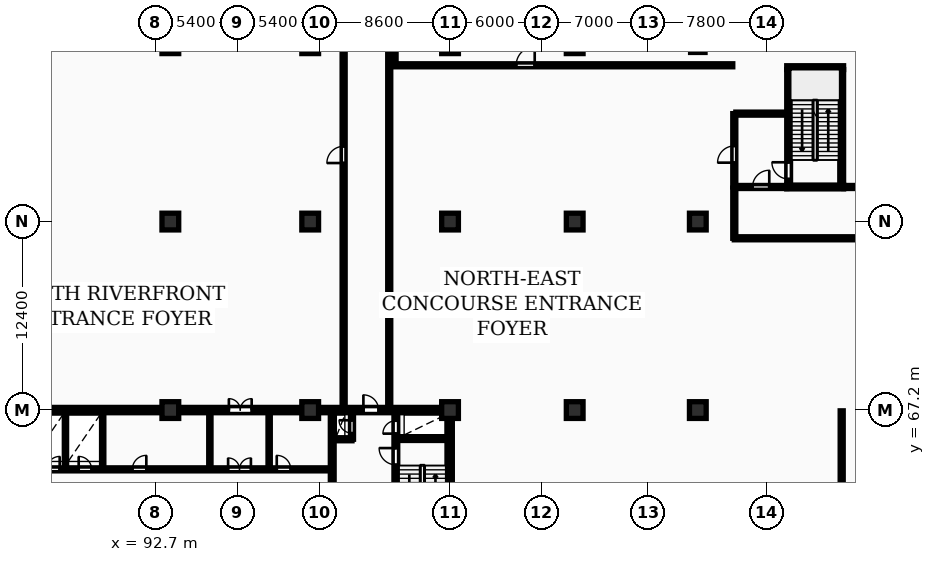
"""IFC4 building model, lengths in metres.
Left out: names, types, materials, properties, quantities, classifications, styles, units other than length and angle.
Written with IfcOpenShell. Run it as: python <this file> out.ifc"""

import sys

from ifc_helpers import new_model, si_unit, direction, frame, frame_2d, origin, origin_2d, place, context, subcontext, project, spatial, rectangle, circle, extrude, element, fill, save


model = new_model("IFC4")
c1 = context("Model", 3, precision=1e-05, world=origin(), true_north=direction((0.0, 1.0)))
c2 = subcontext(c1, "Body", "Model", "MODEL_VIEW")
j1 = project(units=[si_unit("LENGTHUNIT", "METRE"), si_unit("PLANEANGLEUNIT", "RADIAN")], contexts=[c1])
p1 = place(None, origin())
s1 = spatial("IfcSite", under=j1, at=p1, CompositionType="ELEMENT")
p2 = place(p1, origin())
s2 = spatial("IfcBuilding", under=s1, at=p2, CompositionType="ELEMENT")
p3 = place(p2, origin())
s3 = spatial("IfcBuildingStorey", under=s2, at=p3, CompositionType="ELEMENT", Elevation=0.0)
for number, where, z_axis, x_axis in (
    (1, (93.7, 67.2, 0.0), (0.0, 0.0, 1.0), (1.0, 0.0, 0.0)),
    (2, (93.7, 79.6, 0.0), (0.0, 0.0, 1.0), (1.0, 0.0, 0.0)),
    (3, (93.7, 91.2, 0.0), (0.0, 0.0, 1.0), (1.0, 0.0, 0.0)),
    (4, (102.9, 67.2, 0.0), (0.0, 0.0, 1.0), (1.0, 0.0, 0.0)),
    (5, (102.9, 79.6, 0.0), (0.0, 0.0, 1.0), (1.0, 0.0, 0.0)),
    (6, (102.9, 91.2, 0.0), (0.0, 0.0, 1.0), (1.0, 0.0, 0.0)),
    (7, (112.1, 67.2, 0.0), (0.0, 0.0, 1.0), (1.0, 0.0, 0.0)),
    (8, (112.1, 79.6, 0.0), (0.0, 0.0, 1.0), (1.0, 0.0, 0.0)),
    (9, (112.1, 91.2, 0.0), (0.0, 0.0, 1.0), (1.0, 0.0, 0.0)),
    (10, (120.3, 67.2, 0.0), (0.0, 0.0, 1.0), (1.0, 0.0, 0.0)),
    (11, (120.3, 79.6, 0.0), (0.0, 0.0, 1.0), (1.0, 0.0, 0.0)),
    (12, (120.3, 91.2, 0.0), (0.0, 0.0, 1.0), (1.0, 0.0, 0.0)),
    (13, (128.4, 67.2, 0.0), (0.0, 0.0, 1.0), (1.0, 0.0, 0.0)),
    (14, (128.4, 79.6, 0.0), (0.0, 0.0, 1.0), (1.0, 0.0, 0.0)),
):
    element("IfcColumn", number, at=place(p3, frame(where, z_axis=z_axis, x_axis=x_axis)), inside=s3, PredefinedType="COLUMN", context=c2, shape_type="SweptSolid", body=[
        extrude(rectangle(XDim=1.1, YDim=1.1, at=origin_2d()), origin(), (0.0, 0.0, 1.0), 5.4),
    ])
p4 = place(p3, frame((128.4, 91.2, 0.0), z_axis=(0.0, 0.0, 1.0), x_axis=(1.0, 0.0, 0.0)))
e15 = element("IfcColumn", 15, at=p4, inside=s3, PredefinedType="COLUMN", context=c2, shape_type="SweptSolid", body=[
    extrude(circle(Radius=0.475, at=origin_2d()), origin(), (0.0, 0.0, 1.0), 5.4),
])
p5 = place(p3, frame((112.075, 55.375, 0.0), z_axis=(0.0, 0.0, 1.0), x_axis=(0.0, 1.0, 0.0)))
e16 = element("IfcWall", 16, at=p5, inside=s3, PredefinedType="SHEAR", context=c2, shape_type="SweptSolid", body=[
    extrude(rectangle(XDim=11.65, YDim=0.35, at=frame_2d((5.825, 0.0))), origin(), (0.0, 0.0, 1.0), 5.4),
])
p6 = place(p3, frame((75.95, 67.2, 0.0), z_axis=(0.0, 0.0, 1.0), x_axis=(1.0, 0.0, 0.0)))
e17 = element("IfcWall", 17, at=p6, inside=s3, PredefinedType="SHEAR", context=c2, shape_type="SweptSolid", body=[
    extrude(rectangle(XDim=36.3, YDim=0.35, at=frame_2d((18.15, 0.0))), origin(), (0.0, 0.0, 1.0), 5.4),
])
p7 = place(p6, frame((5.25, 0.0, 0.0)))
e18 = element("IfcOpeningElement", 18, at=p7, cuts=e17, PredefinedType="OPENING", context=c2, shape_type="SweptSolid", body=[
    extrude(rectangle(XDim=1.0, YDim=2.15, at=frame_2d((0.5, 1.075))), frame((0.0, 0.185, 0.0), z_axis=(0.0, -1.0, 0.0), x_axis=(1.0, 0.0, 0.0)), (0.0, 0.0, 1.0), 0.37),
])
p8 = place(p6, frame((21.6, 0.0, 0.0)))
e19 = element("IfcOpeningElement", 19, at=p8, cuts=e17, PredefinedType="OPENING", context=c2, shape_type="SweptSolid", body=[
    extrude(rectangle(XDim=1.5, YDim=2.2, at=frame_2d((0.75, 1.1))), frame((0.0, 0.185, 0.0), z_axis=(0.0, -1.0, 0.0), x_axis=(1.0, 0.0, 0.0)), (0.0, 0.0, 1.0), 0.37),
])
p9 = place(p6, frame((30.45, 0.0, 0.0)))
e20 = element("IfcOpeningElement", 20, at=p9, cuts=e17, PredefinedType="OPENING", context=c2, shape_type="SweptSolid", body=[
    extrude(rectangle(XDim=1.0, YDim=2.15, at=frame_2d((0.5, 1.075))), frame((0.0, 0.185, 0.0), z_axis=(0.0, -1.0, 0.0), x_axis=(1.0, 0.0, 0.0)), (0.0, 0.0, 1.0), 0.37),
])
for number, where, z_axis, x_axis in (
    (21, (86.8, 63.4, 0.0), (0.0, 0.0, 1.0), (0.0, 1.0, 0.0)),
    (22, (89.25, 63.4, 0.0), (0.0, 0.0, 1.0), (0.0, 1.0, 0.0)),
    (23, (96.3, 63.4, 0.0), (0.0, 0.0, 1.0), (0.0, 1.0, 0.0)),
    (24, (100.2, 63.4, 0.0), (0.0, 0.0, 1.0), (0.0, 1.0, 0.0)),
):
    element("IfcWall", number, at=place(p3, frame(where, z_axis=z_axis, x_axis=x_axis)), inside=s3, PredefinedType="PARTITIONING", context=c2, shape_type="SweptSolid", body=[
        extrude(rectangle(XDim=3.6, YDim=0.15, at=frame_2d((1.8, 0.0))), origin(), (0.0, 0.0, 1.0), 5.1),
    ])
p10 = place(p3, frame((84.42, 63.3, 0.0), z_axis=(0.0, 0.0, 1.0), x_axis=(1.0, 0.0, 0.0)))
e25 = element("IfcWall", 25, at=p10, inside=s3, PredefinedType="PARTITIONING", context=c2, shape_type="SweptSolid", body=[
    extrude(rectangle(XDim=19.83, YDim=0.2, at=frame_2d((9.915, 0.0))), origin(), (0.0, 0.0, 1.0), 5.1),
])
p11 = place(p10, frame((1.15, 0.0, 0.0)))
e26 = element("IfcOpeningElement", 26, at=p11, cuts=e25, PredefinedType="OPENING", context=c2, shape_type="SweptSolid", body=[
    extrude(rectangle(XDim=0.85, YDim=2.05, at=frame_2d((0.425, 1.025))), frame((0.0, 0.11, 0.0), z_axis=(0.0, -1.0, 0.0), x_axis=(1.0, 0.0, 0.0)), (0.0, 0.0, 1.0), 0.22),
])
p12 = place(p10, frame((3.25, 0.0, 0.0)))
e27 = element("IfcOpeningElement", 27, at=p12, cuts=e25, PredefinedType="OPENING", context=c2, shape_type="SweptSolid", body=[
    extrude(rectangle(XDim=0.85, YDim=2.05, at=frame_2d((0.425, 1.025))), frame((0.0, 0.11, 0.0), z_axis=(0.0, -1.0, 0.0), x_axis=(1.0, 0.0, 0.0)), (0.0, 0.0, 1.0), 0.22),
])
p13 = place(p10, frame((13.08, 0.0, 0.0)))
e28 = element("IfcOpeningElement", 28, at=p13, cuts=e25, PredefinedType="OPENING", context=c2, shape_type="SweptSolid", body=[
    extrude(rectangle(XDim=1.5, YDim=2.2, at=frame_2d((0.75, 1.1))), frame((0.0, 0.11, 0.0), z_axis=(0.0, -1.0, 0.0), x_axis=(1.0, 0.0, 0.0)), (0.0, 0.0, 1.0), 0.22),
])
p14 = place(p10, frame((6.78, 0.0, 0.0)))
e29 = element("IfcOpeningElement", 29, at=p14, cuts=e25, PredefinedType="OPENING", context=c2, shape_type="SweptSolid", body=[
    extrude(rectangle(XDim=0.92, YDim=2.08, at=frame_2d((0.46, 1.04))), frame((0.0, 0.11, 0.0), z_axis=(0.0, -1.0, 0.0), x_axis=(1.0, 0.0, 0.0)), (0.0, 0.0, 1.0), 0.22),
])
p15 = place(p10, frame((16.28, 0.0, 0.0)))
e30 = element("IfcOpeningElement", 30, at=p15, cuts=e25, PredefinedType="OPENING", context=c2, shape_type="SweptSolid", body=[
    extrude(rectangle(XDim=0.92, YDim=2.08, at=frame_2d((0.46, 1.04))), frame((0.0, 0.11, 0.0), z_axis=(0.0, -1.0, 0.0), x_axis=(1.0, 0.0, 0.0)), (0.0, 0.0, 1.0), 0.22),
])
p16 = place(p3, frame((104.45, 65.28, 0.0), z_axis=(0.0, 0.0, 1.0), x_axis=(1.0, 0.0, 0.0)))
e31 = element("IfcWall", 31, at=p16, inside=s3, PredefinedType="PARTITIONING", context=c2, shape_type="SweptSolid", body=[
    extrude(rectangle(XDim=1.2, YDim=0.2, at=frame_2d((0.6, 0.0))), origin(), (0.0, 0.0, 1.0), 5.1),
])
p17 = place(p3, frame((105.65, 65.28, 0.0), z_axis=(0.0, 0.0, 1.0), x_axis=(0.0, 1.0, 0.0)))
e32 = element("IfcWall", 32, at=p17, inside=s3, PredefinedType="PARTITIONING", context=c2, shape_type="SweptSolid", body=[
    extrude(rectangle(XDim=1.72, YDim=0.2, at=frame_2d((0.86, 0.0))), origin(), (0.0, 0.0, 1.0), 5.1),
])
p18 = place(p17, frame((0.4, 0.0, 0.0)))
e33 = element("IfcOpeningElement", 33, at=p18, cuts=e32, PredefinedType="OPENING", context=c2, shape_type="SweptSolid", body=[
    extrude(rectangle(XDim=0.85, YDim=2.05, at=frame_2d((0.425, 1.025))), frame((0.0, 0.11, 0.0), z_axis=(0.0, -1.0, 0.0), x_axis=(1.0, 0.0, 0.0)), (0.0, 0.0, 1.0), 0.22),
])
p19 = place(p3, frame((104.35, 58.4, 0.0), z_axis=(0.0, 0.0, 1.0), x_axis=(0.0, 1.0, 0.0)))
e34 = element("IfcWall", 34, at=p19, inside=s3, PredefinedType="SHEAR", context=c2, shape_type="SweptSolid", body=[
    extrude(rectangle(XDim=8.6, YDim=0.25, at=frame_2d((4.3, 0.0))), origin(), (0.0, 0.0, 1.0), 5.4),
])
p20 = place(p19, frame((1.8, 0.0, 0.0)))
e35 = element("IfcOpeningElement", 35, at=p20, cuts=e34, PredefinedType="OPENING", context=c2, shape_type="SweptSolid", body=[
    extrude(rectangle(XDim=1.1, YDim=2.1, at=frame_2d((0.55, 1.05))), frame((0.0, 0.135, 0.0), z_axis=(0.0, -1.0, 0.0), x_axis=(1.0, 0.0, 0.0)), (0.0, 0.0, 1.0), 0.27),
])
p21 = place(p3, frame((108.535, 55.4, 0.0), z_axis=(0.0, 0.0, 1.0), x_axis=(0.0, 1.0, 0.0)))
e36 = element("IfcWall", 36, at=p21, inside=s3, PredefinedType="SHEAR", context=c2, shape_type="SweptSolid", body=[
    extrude(rectangle(XDim=11.6, YDim=0.25, at=frame_2d((5.8, 0.0))), origin(), (0.0, 0.0, 1.0), 5.4),
])
p22 = place(p21, frame((8.2, 0.0, 0.0)))
e37 = element("IfcOpeningElement", 37, at=p22, cuts=e36, PredefinedType="OPENING", context=c2, shape_type="SweptSolid", body=[
    extrude(rectangle(XDim=1.1, YDim=2.1, at=frame_2d((0.55, 1.05))), frame((0.0, 0.135, 0.0), z_axis=(0.0, -1.0, 0.0), x_axis=(1.0, 0.0, 0.0)), (0.0, 0.0, 1.0), 0.27),
])
p23 = place(p21, frame((10.25, 0.0, 0.0)))
e38 = element("IfcOpeningElement", 38, at=p23, cuts=e36, PredefinedType="OPENING", context=c2, shape_type="SweptSolid", body=[
    extrude(rectangle(XDim=0.85, YDim=2.05, at=frame_2d((0.425, 1.025))), frame((0.0, 0.135, 0.0), z_axis=(0.0, -1.0, 0.0), x_axis=(1.0, 0.0, 0.0)), (0.0, 0.0, 1.0), 0.27),
])
p24 = place(p3, frame((108.66, 65.325, 0.0), z_axis=(0.0, 0.0, 1.0), x_axis=(1.0, 0.0, 0.0)))
e39 = element("IfcWall", 39, at=p24, inside=s3, PredefinedType="SHEAR", context=c2, shape_type="SweptSolid", body=[
    extrude(rectangle(XDim=3.24, YDim=0.25, at=frame_2d((1.62, 0.0))), origin(), (0.0, 0.0, 1.0), 5.4),
])
p25 = place(p3, frame((134.375, 82.0, 0.0), z_axis=(0.0, 0.0, 1.0), x_axis=(0.0, 1.0, 0.0)))
e40 = element("IfcWall", 40, at=p25, inside=s3, PredefinedType="SHEAR", context=c2, shape_type="SweptSolid", body=[
    extrude(rectangle(XDim=7.6, YDim=0.25, at=frame_2d((3.8, 0.0))), origin(), (0.0, 0.0, 1.0), 5.4),
])
p26 = place(p25, frame((0.4, 0.0, 0.0)))
e41 = element("IfcOpeningElement", 41, at=p26, cuts=e40, PredefinedType="OPENING", context=c2, shape_type="SweptSolid", body=[
    extrude(rectangle(XDim=1.1, YDim=2.1, at=frame_2d((0.55, 1.05))), frame((0.0, 0.135, 0.0), z_axis=(0.0, -1.0, 0.0), x_axis=(1.0, 0.0, 0.0)), (0.0, 0.0, 1.0), 0.27),
])
p27 = place(p3, frame((137.865, 82.0, 0.0), z_axis=(0.0, 0.0, 1.0), x_axis=(0.0, 1.0, 0.0)))
e42 = element("IfcWall", 42, at=p27, inside=s3, PredefinedType="SHEAR", context=c2, shape_type="SweptSolid", body=[
    extrude(rectangle(XDim=7.6, YDim=0.25, at=frame_2d((3.8, 0.0))), origin(), (0.0, 0.0, 1.0), 5.4),
])
for number, where, z_axis, x_axis in (
    (43, (134.25, 81.875, 0.0), (0.0, 0.0, 1.0), (1.0, 0.0, 0.0)),
    (44, (134.25, 89.725, 0.0), (0.0, 0.0, 1.0), (1.0, 0.0, 0.0)),
):
    element("IfcWall", number, at=place(p3, frame(where, z_axis=z_axis, x_axis=x_axis)), inside=s3, PredefinedType="SHEAR", context=c2, shape_type="SweptSolid", body=[
        extrude(rectangle(XDim=3.74, YDim=0.25, at=frame_2d((1.87, 0.0))), origin(), (0.0, 0.0, 1.0), 5.4),
    ])
p28 = place(p3, frame((130.8, 81.875, 0.0), z_axis=(0.0, 0.0, 1.0), x_axis=(0.0, 1.0, 0.0)))
e45 = element("IfcWall", 45, at=p28, inside=s3, PredefinedType="PARTITIONING", context=c2, shape_type="SweptSolid", body=[
    extrude(rectangle(XDim=4.825, YDim=0.2, at=frame_2d((2.413, 0.0))), origin(), (0.0, 0.0, 1.0), 5.1),
])
p29 = place(p28, frame((1.6, 0.0, 0.0)))
e46 = element("IfcOpeningElement", 46, at=p29, cuts=e45, PredefinedType="OPENING", context=c2, shape_type="SweptSolid", body=[
    extrude(rectangle(XDim=1.1, YDim=2.15, at=frame_2d((0.55, 1.075))), frame((0.0, 0.11, 0.0), z_axis=(0.0, -1.0, 0.0), x_axis=(1.0, 0.0, 0.0)), (0.0, 0.0, 1.0), 0.22),
])
p30 = place(p3, frame((130.9, 81.875, 0.0), z_axis=(0.0, 0.0, 1.0), x_axis=(1.0, 0.0, 0.0)))
e47 = element("IfcWall", 47, at=p30, inside=s3, PredefinedType="PARTITIONING", context=c2, shape_type="SweptSolid", body=[
    extrude(rectangle(XDim=3.35, YDim=0.2, at=frame_2d((1.675, 0.0))), origin(), (0.0, 0.0, 1.0), 5.1),
])
p31 = place(p30, frame((1.1, 0.0, 0.0)))
e48 = element("IfcOpeningElement", 48, at=p31, cuts=e47, PredefinedType="OPENING", context=c2, shape_type="SweptSolid", body=[
    extrude(rectangle(XDim=1.1, YDim=2.1, at=frame_2d((0.55, 1.05))), frame((0.0, 0.11, 0.0), z_axis=(0.0, -1.0, 0.0), x_axis=(1.0, 0.0, 0.0)), (0.0, 0.0, 1.0), 0.22),
])
p32 = place(p3, frame((130.9, 86.7, 0.0), z_axis=(0.0, 0.0, 1.0), x_axis=(1.0, 0.0, 0.0)))
e49 = element("IfcWall", 49, at=p32, inside=s3, PredefinedType="PARTITIONING", context=c2, shape_type="SweptSolid", body=[
    extrude(rectangle(XDim=3.35, YDim=0.2, at=frame_2d((1.675, 0.0))), origin(), (0.0, 0.0, 1.0), 5.1),
])
p33 = place(p3, frame((105.1, 67.45, 0.0), z_axis=(0.0, 0.0, 1.0), x_axis=(0.0, 1.0, 0.0)))
e50 = element("IfcWall", 50, at=p33, inside=s3, PredefinedType="PARTITIONING", context=c2, shape_type="SweptSolid", body=[
    extrude(rectangle(XDim=41.45, YDim=0.2, at=frame_2d((20.725, 0.0))), origin(), (0.0, 0.0, 1.0), 5.1),
])
p34 = place(p33, frame((16.0, 0.0, 0.0)))
e51 = element("IfcOpeningElement", 51, at=p34, cuts=e50, PredefinedType="OPENING", context=c2, shape_type="SweptSolid", body=[
    extrude(rectangle(XDim=1.1, YDim=2.1, at=frame_2d((0.55, 1.05))), frame((0.0, 0.11, 0.0), z_axis=(0.0, -1.0, 0.0), x_axis=(1.0, 0.0, 0.0)), (0.0, 0.0, 1.0), 0.22),
])
p35 = place(p3, frame((108.1, 67.45, 0.0), z_axis=(0.0, 0.0, 1.0), x_axis=(0.0, 1.0, 0.0)))
e52 = element("IfcWall", 52, at=p35, inside=s3, PredefinedType="PARTITIONING", context=c2, shape_type="SweptSolid", body=[
    extrude(rectangle(XDim=41.45, YDim=0.2, at=frame_2d((20.725, 0.0))), origin(), (0.0, 0.0, 1.0), 5.1),
])
p36 = place(p3, frame((130.8, 78.5, 0.0), z_axis=(0.0, 0.0, 1.0), x_axis=(1.0, 0.0, 0.0)))
e53 = element("IfcWall", 53, at=p36, inside=s3, PredefinedType="PARTITIONING", context=c2, shape_type="SweptSolid", body=[
    extrude(rectangle(XDim=22.4, YDim=0.2, at=frame_2d((11.2, 0.0))), origin(), (0.0, 0.0, 1.0), 5.1),
])
p37 = place(p3, frame((138.0, 81.875, 0.0), z_axis=(0.0, 0.0, 1.0), x_axis=(1.0, 0.0, 0.0)))
e54 = element("IfcWall", 54, at=p37, inside=s3, PredefinedType="PARTITIONING", context=c2, shape_type="SweptSolid", body=[
    extrude(rectangle(XDim=15.2, YDim=0.2, at=frame_2d((7.6, 0.0))), origin(), (0.0, 0.0, 1.0), 5.1),
])
p38 = place(p3, frame((130.8, 78.5, 0.0), z_axis=(0.0, 0.0, 1.0), x_axis=(0.0, 1.0, 0.0)))
e55 = element("IfcWall", 55, at=p38, inside=s3, PredefinedType="PARTITIONING", context=c2, shape_type="SweptSolid", body=[
    extrude(rectangle(XDim=3.3, YDim=0.2, at=frame_2d((1.65, 0.0))), origin(), (0.0, 0.0, 1.0), 5.1),
])
p39 = place(p3, frame((137.865, 50.85, 0.0), z_axis=(0.0, 0.0, 1.0), x_axis=(0.0, 1.0, 0.0)))
e56 = element("IfcWall", 56, at=p39, inside=s3, PredefinedType="PARTITIONING", context=c2, shape_type="SweptSolid", body=[
    extrude(rectangle(XDim=16.3, YDim=0.2, at=frame_2d((8.15, 0.0))), origin(), (0.0, 0.0, 1.0), 5.1),
])
p40 = place(p39, frame((6.5, 0.0, 0.0)))
e57 = element("IfcOpeningElement", 57, at=p40, cuts=e56, PredefinedType="OPENING", context=c2, shape_type="SweptSolid", body=[
    extrude(rectangle(XDim=1.2, YDim=2.15, at=frame_2d((0.6, 1.075))), frame((0.0, 0.11, 0.0), z_axis=(0.0, -1.0, 0.0), x_axis=(1.0, 0.0, 0.0)), (0.0, 0.0, 1.0), 0.22),
])
p41 = place(p3, frame((108.45, 89.88, 0.0), z_axis=(0.0, 0.0, 1.0), x_axis=(1.0, 0.0, 0.0)))
e58 = element("IfcWall", 58, at=p41, inside=s3, PredefinedType="PARTITIONING", context=c2, shape_type="SweptSolid", body=[
    extrude(rectangle(XDim=22.25, YDim=0.2, at=frame_2d((11.125, 0.0))), origin(), (0.0, 0.0, 1.0), 5.1),
])
p42 = place(p41, frame((8.0, 0.0, 0.0)))
e59 = element("IfcOpeningElement", 59, at=p42, cuts=e58, PredefinedType="OPENING", context=c2, shape_type="SweptSolid", body=[
    extrude(rectangle(XDim=1.22, YDim=2.18, at=frame_2d((0.61, 1.09))), frame((0.0, 0.11, 0.0), z_axis=(0.0, -1.0, 0.0), x_axis=(1.0, 0.0, 0.0)), (0.0, 0.0, 1.0), 0.22),
])
p43 = place(p3, frame((108.45, 89.88, 0.0), z_axis=(0.0, 0.0, 1.0), x_axis=(0.0, 1.0, 0.0)))
e60 = element("IfcWall", 60, at=p43, inside=s3, PredefinedType="PARTITIONING", context=c2, shape_type="SweptSolid", body=[
    extrude(rectangle(XDim=19.07, YDim=0.2, at=frame_2d((9.535, 0.0))), origin(), (0.0, 0.0, 1.0), 5.1),
])
p44 = place(p8, origin())
e61 = element("IfcDoor", 61, at=p44, inside=s3, OperationType="DOUBLE_DOOR_SINGLE_SWING", PredefinedType="DOOR", context=c2, shape_type="SweptSolid", body=[
    extrude(rectangle(XDim=1.5, YDim=2.2, at=frame_2d((0.75, 1.1))), frame((0.0, 0.025, 0.0), z_axis=(0.0, -1.0, 0.0), x_axis=(1.0, 0.0, 0.0)), (0.0, 0.0, 1.0), 0.05),
])
fill(e19, e61)
p45 = place(p9, origin())
e62 = element("IfcDoor", 62, at=p45, inside=s3, OperationType="SINGLE_SWING_LEFT", PredefinedType="DOOR", context=c2, shape_type="SweptSolid", body=[
    extrude(rectangle(XDim=1.0, YDim=2.15, at=frame_2d((0.5, 1.075))), frame((0.0, 0.025, 0.0), z_axis=(0.0, -1.0, 0.0), x_axis=(1.0, 0.0, 0.0)), (0.0, 0.0, 1.0), 0.05),
])
fill(e20, e62)
p46 = place(p11, origin())
e63 = element("IfcDoor", 63, at=p46, inside=s3, OperationType="SINGLE_SWING_RIGHT", PredefinedType="DOOR", context=c2, shape_type="SweptSolid", body=[
    extrude(rectangle(XDim=0.85, YDim=2.05, at=frame_2d((0.425, 1.025))), frame((0.0, 0.025, 0.0), z_axis=(0.0, -1.0, 0.0), x_axis=(1.0, 0.0, 0.0)), (0.0, 0.0, 1.0), 0.05),
])
fill(e26, e63)
p47 = place(p12, origin())
e64 = element("IfcDoor", 64, at=p47, inside=s3, OperationType="SINGLE_SWING_LEFT", PredefinedType="DOOR", context=c2, shape_type="SweptSolid", body=[
    extrude(rectangle(XDim=0.85, YDim=2.05, at=frame_2d((0.425, 1.025))), frame((0.0, 0.025, 0.0), z_axis=(0.0, -1.0, 0.0), x_axis=(1.0, 0.0, 0.0)), (0.0, 0.0, 1.0), 0.05),
])
fill(e27, e64)
p48 = place(p13, origin())
e65 = element("IfcDoor", 65, at=p48, inside=s3, OperationType="DOUBLE_DOOR_SINGLE_SWING", PredefinedType="DOOR", context=c2, shape_type="SweptSolid", body=[
    extrude(rectangle(XDim=1.5, YDim=2.2, at=frame_2d((0.75, 1.1))), frame((0.0, 0.025, 0.0), z_axis=(0.0, -1.0, 0.0), x_axis=(1.0, 0.0, 0.0)), (0.0, 0.0, 1.0), 0.05),
])
fill(e28, e65)
p49 = place(p14, origin())
e66 = element("IfcDoor", 66, at=p49, inside=s3, OperationType="SINGLE_SWING_RIGHT", PredefinedType="DOOR", context=c2, shape_type="SweptSolid", body=[
    extrude(rectangle(XDim=0.92, YDim=2.08, at=frame_2d((0.46, 1.04))), frame((0.0, 0.025, 0.0), z_axis=(0.0, -1.0, 0.0), x_axis=(1.0, 0.0, 0.0)), (0.0, 0.0, 1.0), 0.05),
])
fill(e29, e66)
p50 = place(p15, origin())
e67 = element("IfcDoor", 67, at=p50, inside=s3, OperationType="SINGLE_SWING_LEFT", PredefinedType="DOOR", context=c2, shape_type="SweptSolid", body=[
    extrude(rectangle(XDim=0.92, YDim=2.08, at=frame_2d((0.46, 1.04))), frame((0.0, 0.025, 0.0), z_axis=(0.0, -1.0, 0.0), x_axis=(1.0, 0.0, 0.0)), (0.0, 0.0, 1.0), 0.05),
])
fill(e30, e67)
p51 = place(p18, origin())
e68 = element("IfcDoor", 68, at=p51, inside=s3, OperationType="SINGLE_SWING_RIGHT", PredefinedType="DOOR", context=c2, shape_type="SweptSolid", body=[
    extrude(rectangle(XDim=0.85, YDim=2.05, at=frame_2d((0.425, 1.025))), frame((0.0, 0.025, 0.0), z_axis=(0.0, -1.0, 0.0), x_axis=(1.0, 0.0, 0.0)), (0.0, 0.0, 1.0), 0.05),
])
fill(e33, e68)
p52 = place(p22, origin())
e69 = element("IfcDoor", 69, at=p52, inside=s3, OperationType="SINGLE_SWING_RIGHT", PredefinedType="DOOR", context=c2, shape_type="SweptSolid", body=[
    extrude(rectangle(XDim=1.1, YDim=2.1, at=frame_2d((0.55, 1.05))), frame((0.0, 0.025, 0.0), z_axis=(0.0, -1.0, 0.0), x_axis=(1.0, 0.0, 0.0)), (0.0, 0.0, 1.0), 0.05),
])
fill(e37, e69)
p53 = place(p23, origin())
e70 = element("IfcDoor", 70, at=p53, inside=s3, OperationType="SINGLE_SWING_LEFT", PredefinedType="DOOR", context=c2, shape_type="SweptSolid", body=[
    extrude(rectangle(XDim=0.85, YDim=2.05, at=frame_2d((0.425, 1.025))), frame((0.0, 0.025, 0.0), z_axis=(0.0, -1.0, 0.0), x_axis=(1.0, 0.0, 0.0)), (0.0, 0.0, 1.0), 0.05),
])
fill(e38, e70)
p54 = place(p26, origin())
e71 = element("IfcDoor", 71, at=p54, inside=s3, OperationType="SINGLE_SWING_RIGHT", PredefinedType="DOOR", context=c2, shape_type="SweptSolid", body=[
    extrude(rectangle(XDim=1.1, YDim=2.1, at=frame_2d((0.55, 1.05))), frame((0.0, 0.025, 0.0), z_axis=(0.0, -1.0, 0.0), x_axis=(1.0, 0.0, 0.0)), (0.0, 0.0, 1.0), 0.05),
])
fill(e41, e71)
p55 = place(p29, origin())
e72 = element("IfcDoor", 72, at=p55, inside=s3, OperationType="SINGLE_SWING_LEFT", PredefinedType="DOOR", context=c2, shape_type="SweptSolid", body=[
    extrude(rectangle(XDim=1.1, YDim=2.15, at=frame_2d((0.55, 1.075))), frame((0.0, 0.025, 0.0), z_axis=(0.0, -1.0, 0.0), x_axis=(1.0, 0.0, 0.0)), (0.0, 0.0, 1.0), 0.05),
])
fill(e46, e72)
p56 = place(p31, origin())
e73 = element("IfcDoor", 73, at=p56, inside=s3, OperationType="SINGLE_SWING_RIGHT", PredefinedType="DOOR", context=c2, shape_type="SweptSolid", body=[
    extrude(rectangle(XDim=1.1, YDim=2.1, at=frame_2d((0.55, 1.05))), frame((0.0, 0.025, 0.0), z_axis=(0.0, -1.0, 0.0), x_axis=(1.0, 0.0, 0.0)), (0.0, 0.0, 1.0), 0.05),
])
fill(e48, e73)
p57 = place(p34, origin())
e74 = element("IfcDoor", 74, at=p57, inside=s3, OperationType="SINGLE_SWING_LEFT", PredefinedType="DOOR", context=c2, shape_type="SweptSolid", body=[
    extrude(rectangle(XDim=1.1, YDim=2.1, at=frame_2d((0.55, 1.05))), frame((0.0, 0.025, 0.0), z_axis=(0.0, -1.0, 0.0), x_axis=(1.0, 0.0, 0.0)), (0.0, 0.0, 1.0), 0.05),
])
fill(e51, e74)
p58 = place(p42, origin())
e75 = element("IfcDoor", 75, at=p58, inside=s3, OperationType="SINGLE_SWING_RIGHT", PredefinedType="DOOR", context=c2, shape_type="SweptSolid", body=[
    extrude(rectangle(XDim=1.22, YDim=2.18, at=frame_2d((0.61, 1.09))), frame((0.0, 0.025, 0.0), z_axis=(0.0, -1.0, 0.0), x_axis=(1.0, 0.0, 0.0)), (0.0, 0.0, 1.0), 0.05),
])
fill(e59, e75)
save(model, sys.argv[1])
